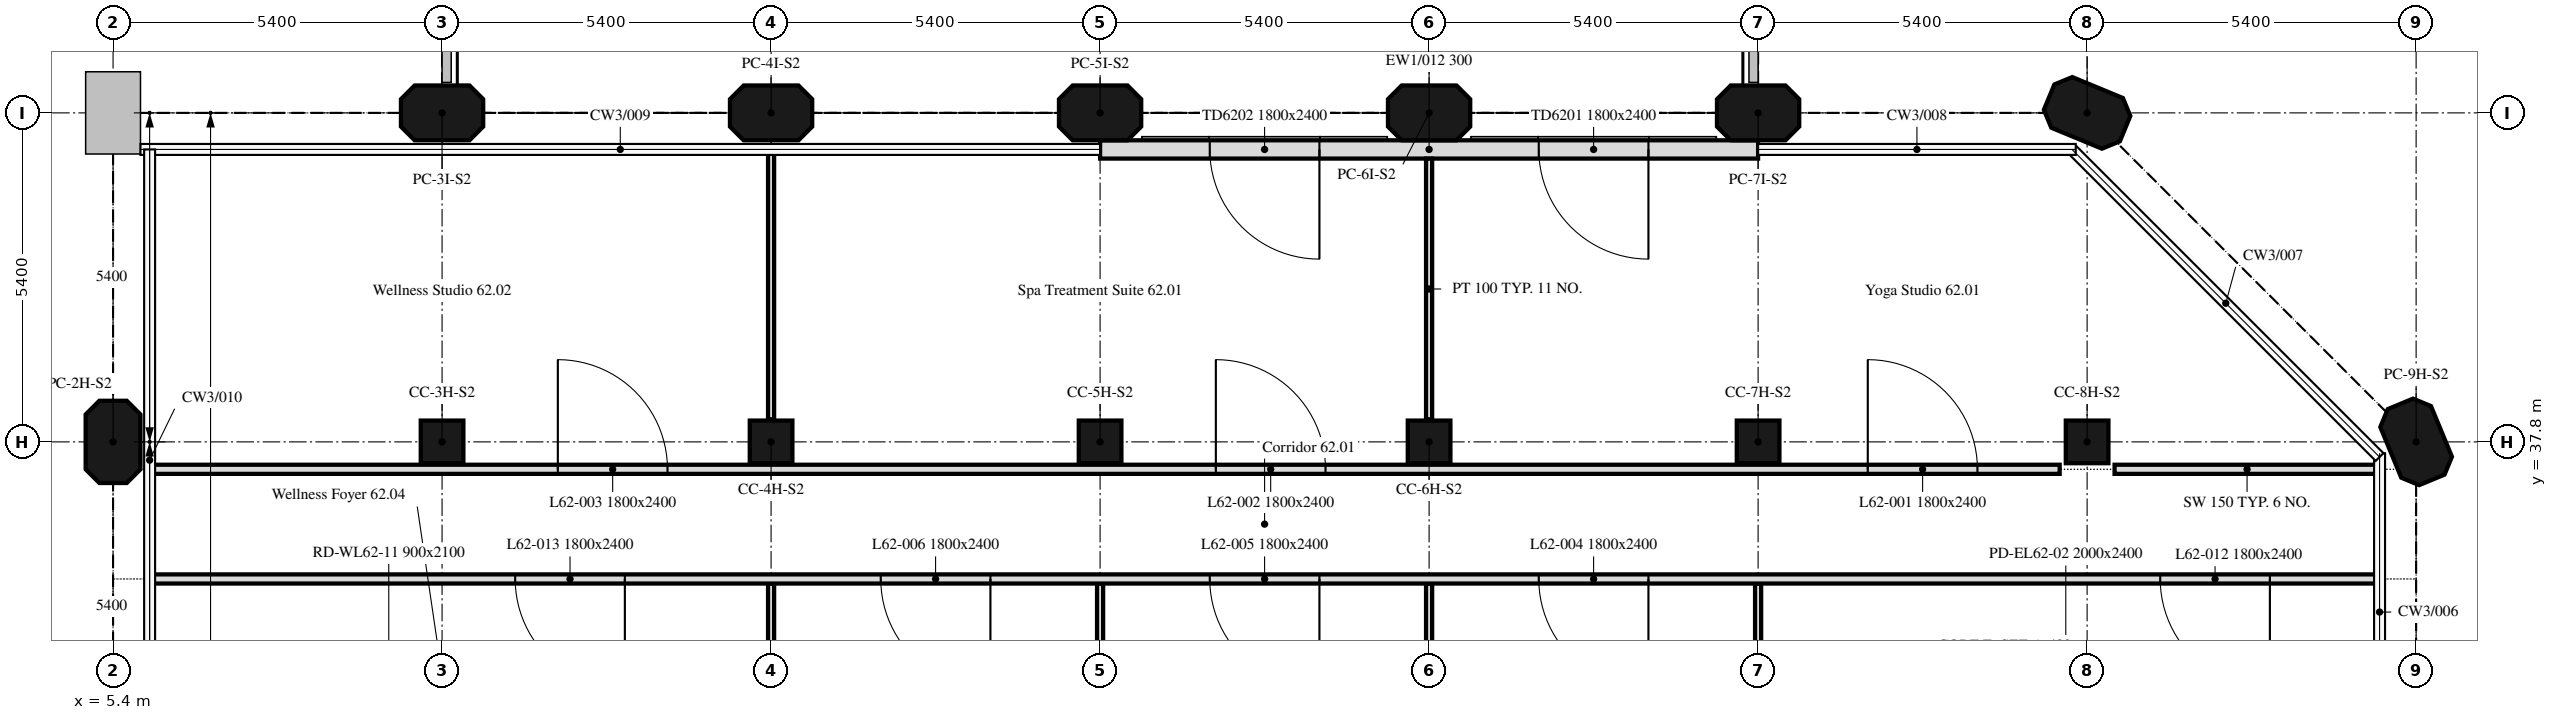
"""IFC4 building model, lengths in metres.
Left out: names, types, materials, properties, quantities, classifications, styles, units other than length and angle.
Written with IfcOpenShell. Run it as: python <this file> out.ifc"""

import sys

from ifc_helpers import new_model, si_unit, direction, frame, frame_2d, origin, origin_2d, place, context, subcontext, project, spatial, polyline, rectangle, outline, extrude, element, fill, save


model = new_model("IFC4")
c1 = context("Model", 3, precision=1e-05, world=origin(), true_north=direction((0.0, 1.0)))
c2 = subcontext(c1, "Body", "Model", "MODEL_VIEW")
j1 = project(units=[si_unit("LENGTHUNIT", "METRE"), si_unit("PLANEANGLEUNIT", "RADIAN")], contexts=[c1])
p1 = place(None, origin())
s1 = spatial("IfcSite", under=j1, at=p1, CompositionType="ELEMENT")
p2 = place(p1, origin())
s2 = spatial("IfcBuilding", under=s1, at=p2, CompositionType="ELEMENT")
p3 = place(p2, frame((0.0, 0.0, 255.7)))
s3 = spatial("IfcBuildingStorey", under=s2, at=p3, CompositionType="ELEMENT", Elevation=255.7)
p4 = place(p3, frame((5.4, 37.8, 0.0), z_axis=(0.0, 0.0, 1.0), x_axis=(0.0, 1.0, 0.0)))
e1 = element("IfcColumn", 1, at=p4, inside=s3, PredefinedType="COLUMN", context=c2, shape_type="SweptSolid", body=[
    extrude(outline(polyline([(-0.45, -0.45), (0.45, -0.45), (0.675, -0.225), (0.675, 0.225), (0.45, 0.45), (-0.45, 0.45), (-0.675, 0.225), (-0.675, -0.225), (-0.45, -0.45)])), origin(), (0.0, 0.0, 1.0), 4.5),
])
for number, where, z_axis, x_axis in (
    (2, (10.8, 37.8, 0.0), (0.0, 0.0, 1.0), (1.0, 0.0, 0.0)),
    (3, (16.2, 37.8, 0.0), (0.0, 0.0, 1.0), (1.0, 0.0, 0.0)),
    (4, (21.6, 37.8, 0.0), (0.0, 0.0, 1.0), (1.0, 0.0, 0.0)),
    (5, (27.0, 37.8, 0.0), (0.0, 0.0, 1.0), (1.0, 0.0, 0.0)),
    (6, (32.4, 37.8, 0.0), (0.0, 0.0, 1.0), (1.0, 0.0, 0.0)),
    (7, (37.8, 37.8, 0.0), (0.0, 0.0, 1.0), (1.0, 0.0, 0.0)),
):
    element("IfcColumn", number, at=place(p3, frame(where, z_axis=z_axis, x_axis=x_axis)), inside=s3, PredefinedType="COLUMN", context=c2, shape_type="SweptSolid", body=[
        extrude(rectangle(XDim=0.7, YDim=0.7, at=origin_2d()), origin(), (0.0, 0.0, 1.0), 4.5),
    ])
for number, where, z_axis, x_axis in (
    (8, (43.2, 37.8, 0.0), (0.0, 0.0, 1.0), (-0.383, 0.924, 0.0)),
    (9, (10.8, 43.2, 0.0), (0.0, 0.0, 1.0), (1.0, 0.0, 0.0)),
    (10, (16.2, 43.2, 0.0), (0.0, 0.0, 1.0), (1.0, 0.0, 0.0)),
    (11, (21.6, 43.2, 0.0), (0.0, 0.0, 1.0), (1.0, 0.0, 0.0)),
    (12, (27.0, 43.2, 0.0), (0.0, 0.0, 1.0), (1.0, 0.0, 0.0)),
    (13, (32.4, 43.2, 0.0), (0.0, 0.0, 1.0), (1.0, 0.0, 0.0)),
    (14, (37.8, 43.2, 0.0), (0.0, 0.0, 1.0), (-0.924, 0.383, 0.0)),
):
    element("IfcColumn", number, at=place(p3, frame(where, z_axis=z_axis, x_axis=x_axis)), inside=s3, PredefinedType="COLUMN", context=c2, shape_type="SweptSolid", body=[
        extrude(outline(polyline([(-0.45, -0.45), (0.45, -0.45), (0.675, -0.225), (0.675, 0.225), (0.45, 0.45), (-0.45, 0.45), (-0.675, 0.225), (-0.675, -0.225), (-0.45, -0.45)])), origin(), (0.0, 0.0, 1.0), 4.5),
    ])
p5 = place(p3, frame((32.4, 42.6, 0.0), z_axis=(0.0, 0.0, 1.0), x_axis=(-1.0, 0.0, 0.0)))
e15 = element("IfcWall", 15, at=p5, inside=s3, PredefinedType="SOLIDWALL", context=c2, shape_type="SweptSolid", body=[
    extrude(rectangle(XDim=10.8, YDim=0.3, at=frame_2d((5.4, 0.0))), origin(), (0.0, 0.0, 1.0), 4.5),
])
p6 = place(p5, frame((1.8, 0.0, 0.0)))
e16 = element("IfcOpeningElement", 16, at=p6, cuts=e15, PredefinedType="OPENING", context=c2, shape_type="SweptSolid", body=[
    extrude(rectangle(XDim=1.8, YDim=2.4, at=frame_2d((0.9, 1.2))), frame((0.0, 0.16, 0.0), z_axis=(0.0, -1.0, 0.0), x_axis=(1.0, 0.0, 0.0)), (0.0, 0.0, 1.0), 0.32),
])
p7 = place(p5, frame((7.2, 0.0, 0.0)))
e17 = element("IfcOpeningElement", 17, at=p7, cuts=e15, PredefinedType="OPENING", context=c2, shape_type="SweptSolid", body=[
    extrude(rectangle(XDim=1.8, YDim=2.4, at=frame_2d((0.9, 1.2))), frame((0.0, 0.16, 0.0), z_axis=(0.0, -1.0, 0.0), x_axis=(1.0, 0.0, 0.0)), (0.0, 0.0, 1.0), 0.32),
])
p8 = place(p3, frame((27.0, 42.449, 0.0), z_axis=(0.0, 0.0, 1.0), x_axis=(0.0, -1.0, 0.0)))
e18 = element("IfcWall", 18, at=p8, inside=s3, PredefinedType="PARTITIONING", context=c2, shape_type="SweptSolid", body=[
    extrude(rectangle(XDim=4.279, YDim=0.1, at=frame_2d((2.14, 0.0))), origin(), (0.0, 0.0, 1.0), 4.5),
])
p9 = place(p3, frame((38.251, 37.35, 0.0), z_axis=(0.0, 0.0, 1.0), x_axis=(1.0, 0.0, 0.0)))
e19 = element("IfcWall", 19, at=p9, inside=s3, PredefinedType="PARTITIONING", context=c2, shape_type="SweptSolid", body=[
    extrude(rectangle(XDim=4.349, YDim=0.15, at=frame_2d((2.175, 0.0))), origin(), (0.0, 0.0, 1.0), 4.5),
])
p10 = place(p3, frame((16.2, 42.6, 0.0), z_axis=(0.0, 0.0, 1.0), x_axis=(0.0, -1.0, 0.0)))
e20 = element("IfcWall", 20, at=p10, inside=s3, PredefinedType="PARTITIONING", context=c2, shape_type="SweptSolid", body=[
    extrude(rectangle(XDim=4.43, YDim=0.1, at=frame_2d((2.215, 0.0))), origin(), (0.0, 0.0, 1.0), 4.5),
])
p11 = place(p3, frame((6.0, 37.35, 0.0), z_axis=(0.0, 0.0, 1.0), x_axis=(1.0, 0.0, 0.0)))
e21 = element("IfcWall", 21, at=p11, inside=s3, PredefinedType="PARTITIONING", context=c2, shape_type="SweptSolid", body=[
    extrude(rectangle(XDim=31.349, YDim=0.15, at=frame_2d((15.675, 0.0))), origin(), (0.0, 0.0, 1.0), 4.5),
])
p12 = place(p11, frame((28.2, 0.0, 0.0)))
e22 = element("IfcOpeningElement", 22, at=p12, cuts=e21, PredefinedType="OPENING", context=c2, shape_type="SweptSolid", body=[
    extrude(rectangle(XDim=1.8, YDim=2.4, at=frame_2d((0.9, 1.2))), frame((0.0, 0.075, 0.0), z_axis=(0.0, -1.0, 0.0), x_axis=(1.0, 0.0, 0.0)), (0.0, 0.0, 1.0), 0.15),
])
p13 = place(p11, frame((17.5, 0.0, 0.0)))
e23 = element("IfcOpeningElement", 23, at=p13, cuts=e21, PredefinedType="OPENING", context=c2, shape_type="SweptSolid", body=[
    extrude(rectangle(XDim=1.8, YDim=2.4, at=frame_2d((0.9, 1.2))), frame((0.0, 0.075, 0.0), z_axis=(0.0, -1.0, 0.0), x_axis=(1.0, 0.0, 0.0)), (0.0, 0.0, 1.0), 0.15),
])
p14 = place(p11, frame((6.7, 0.0, 0.0)))
e24 = element("IfcOpeningElement", 24, at=p14, cuts=e21, PredefinedType="OPENING", context=c2, shape_type="SweptSolid", body=[
    extrude(rectangle(XDim=1.8, YDim=2.4, at=frame_2d((0.9, 1.2))), frame((0.0, 0.075, 0.0), z_axis=(0.0, -1.0, 0.0), x_axis=(1.0, 0.0, 0.0)), (0.0, 0.0, 1.0), 0.15),
])
p15 = place(p3, frame((32.4, 32.4, 0.0), z_axis=(0.0, 0.0, 1.0), x_axis=(0.0, 1.0, 0.0)))
e25 = element("IfcWall", 25, at=p15, inside=s3, PredefinedType="PARTITIONING", context=c2, shape_type="SweptSolid", body=[
    extrude(rectangle(XDim=3.075, YDim=0.1, at=frame_2d((1.538, 0.0))), origin(), (0.0, 0.0, 1.0), 4.5),
])
for number, where, z_axis, x_axis in (
    (26, (27.0, 35.475, 0.0), (0.0, 0.0, 1.0), (0.0, -1.0, 0.0)),
    (27, (21.6, 35.475, 0.0), (0.0, 0.0, 1.0), (0.0, -1.0, 0.0)),
):
    element("IfcWall", number, at=place(p3, frame(where, z_axis=z_axis, x_axis=x_axis)), inside=s3, PredefinedType="PARTITIONING", context=c2, shape_type="SweptSolid", body=[
        extrude(rectangle(XDim=2.655, YDim=0.1, at=frame_2d((1.328, 0.0))), origin(), (0.0, 0.0, 1.0), 4.5),
    ])
p16 = place(p3, frame((16.2, 35.475, 0.0), z_axis=(0.0, 0.0, 1.0), x_axis=(0.0, -1.0, 0.0)))
e28 = element("IfcWall", 28, at=p16, inside=s3, PredefinedType="PARTITIONING", context=c2, shape_type="SweptSolid", body=[
    extrude(rectangle(XDim=3.075, YDim=0.1, at=frame_2d((1.538, 0.0))), origin(), (0.0, 0.0, 1.0), 4.5),
])
p17 = place(p3, frame((42.6, 35.55, 0.0), z_axis=(0.0, 0.0, 1.0), x_axis=(-1.0, 0.0, 0.0)))
e29 = element("IfcWall", 29, at=p17, inside=s3, PredefinedType="PARTITIONING", context=c2, shape_type="SweptSolid", body=[
    extrude(rectangle(XDim=36.6, YDim=0.15, at=frame_2d((18.3, 0.0))), origin(), (0.0, 0.0, 1.0), 4.5),
])
p18 = place(p17, frame((12.0, 0.0, 0.0)))
e30 = element("IfcOpeningElement", 30, at=p18, cuts=e29, PredefinedType="OPENING", context=c2, shape_type="SweptSolid", body=[
    extrude(rectangle(XDim=1.8, YDim=2.4, at=frame_2d((0.9, 1.2))), frame((0.0, 0.075, 0.0), z_axis=(0.0, -1.0, 0.0), x_axis=(1.0, 0.0, 0.0)), (0.0, 0.0, 1.0), 0.15),
])
p19 = place(p17, frame((17.4, 0.0, 0.0)))
e31 = element("IfcOpeningElement", 31, at=p19, cuts=e29, PredefinedType="OPENING", context=c2, shape_type="SweptSolid", body=[
    extrude(rectangle(XDim=1.8, YDim=2.4, at=frame_2d((0.9, 1.2))), frame((0.0, 0.075, 0.0), z_axis=(0.0, -1.0, 0.0), x_axis=(1.0, 0.0, 0.0)), (0.0, 0.0, 1.0), 0.15),
])
p20 = place(p17, frame((22.8, 0.0, 0.0)))
e32 = element("IfcOpeningElement", 32, at=p20, cuts=e29, PredefinedType="OPENING", context=c2, shape_type="SweptSolid", body=[
    extrude(rectangle(XDim=1.8, YDim=2.4, at=frame_2d((0.9, 1.2))), frame((0.0, 0.075, 0.0), z_axis=(0.0, -1.0, 0.0), x_axis=(1.0, 0.0, 0.0)), (0.0, 0.0, 1.0), 0.15),
])
p21 = place(p17, frame((1.8, 0.0, 0.0)))
e33 = element("IfcOpeningElement", 33, at=p21, cuts=e29, PredefinedType="OPENING", context=c2, shape_type="SweptSolid", body=[
    extrude(rectangle(XDim=1.8, YDim=2.4, at=frame_2d((0.9, 1.2))), frame((0.0, 0.075, 0.0), z_axis=(0.0, -1.0, 0.0), x_axis=(1.0, 0.0, 0.0)), (0.0, 0.0, 1.0), 0.15),
])
p22 = place(p17, frame((28.8, 0.0, 0.0)))
e34 = element("IfcOpeningElement", 34, at=p22, cuts=e29, PredefinedType="OPENING", context=c2, shape_type="SweptSolid", body=[
    extrude(rectangle(XDim=1.8, YDim=2.4, at=frame_2d((0.9, 1.2))), frame((0.0, 0.075, 0.0), z_axis=(0.0, -1.0, 0.0), x_axis=(1.0, 0.0, 0.0)), (0.0, 0.0, 1.0), 0.15),
])
p23 = place(p6, origin())
e35 = element("IfcDoor", 35, at=p23, inside=s3, OperationType="DOUBLE_DOOR_DOUBLE_SWING", PredefinedType="DOOR", context=c2, shape_type="SweptSolid", body=[
    extrude(rectangle(XDim=1.8, YDim=2.4, at=frame_2d((0.9, 1.2))), frame((0.0, 0.025, 0.0), z_axis=(0.0, -1.0, 0.0), x_axis=(1.0, 0.0, 0.0)), (0.0, 0.0, 1.0), 0.05),
])
fill(e16, e35)
p24 = place(p7, origin())
e36 = element("IfcDoor", 36, at=p24, inside=s3, OperationType="DOUBLE_DOOR_DOUBLE_SWING", PredefinedType="DOOR", context=c2, shape_type="SweptSolid", body=[
    extrude(rectangle(XDim=1.8, YDim=2.4, at=frame_2d((0.9, 1.2))), frame((0.0, 0.025, 0.0), z_axis=(0.0, -1.0, 0.0), x_axis=(1.0, 0.0, 0.0)), (0.0, 0.0, 1.0), 0.05),
])
fill(e17, e36)
p25 = place(p12, origin())
e37 = element("IfcDoor", 37, at=p25, inside=s3, OperationType="DOUBLE_DOOR_SINGLE_SWING", PredefinedType="DOOR", context=c2, shape_type="SweptSolid", body=[
    extrude(rectangle(XDim=1.8, YDim=2.4, at=frame_2d((0.9, 1.2))), frame((0.0, 0.025, 0.0), z_axis=(0.0, -1.0, 0.0), x_axis=(1.0, 0.0, 0.0)), (0.0, 0.0, 1.0), 0.05),
])
fill(e22, e37)
p26 = place(p13, origin())
e38 = element("IfcDoor", 38, at=p26, inside=s3, OperationType="DOUBLE_DOOR_SINGLE_SWING", PredefinedType="DOOR", context=c2, shape_type="SweptSolid", body=[
    extrude(rectangle(XDim=1.8, YDim=2.4, at=frame_2d((0.9, 1.2))), frame((0.0, 0.025, 0.0), z_axis=(0.0, -1.0, 0.0), x_axis=(1.0, 0.0, 0.0)), (0.0, 0.0, 1.0), 0.05),
])
fill(e23, e38)
p27 = place(p14, origin())
e39 = element("IfcDoor", 39, at=p27, inside=s3, OperationType="DOUBLE_DOOR_SINGLE_SWING", PredefinedType="DOOR", context=c2, shape_type="SweptSolid", body=[
    extrude(rectangle(XDim=1.8, YDim=2.4, at=frame_2d((0.9, 1.2))), frame((0.0, 0.025, 0.0), z_axis=(0.0, -1.0, 0.0), x_axis=(1.0, 0.0, 0.0)), (0.0, 0.0, 1.0), 0.05),
])
fill(e24, e39)
p28 = place(p18, origin())
e40 = element("IfcDoor", 40, at=p28, inside=s3, OperationType="DOUBLE_DOOR_SINGLE_SWING", PredefinedType="DOOR", context=c2, shape_type="SweptSolid", body=[
    extrude(rectangle(XDim=1.8, YDim=2.4, at=frame_2d((0.9, 1.2))), frame((0.0, 0.025, 0.0), z_axis=(0.0, -1.0, 0.0), x_axis=(1.0, 0.0, 0.0)), (0.0, 0.0, 1.0), 0.05),
])
fill(e30, e40)
p29 = place(p19, origin())
e41 = element("IfcDoor", 41, at=p29, inside=s3, OperationType="DOUBLE_DOOR_SINGLE_SWING", PredefinedType="DOOR", context=c2, shape_type="SweptSolid", body=[
    extrude(rectangle(XDim=1.8, YDim=2.4, at=frame_2d((0.9, 1.2))), frame((0.0, 0.025, 0.0), z_axis=(0.0, -1.0, 0.0), x_axis=(1.0, 0.0, 0.0)), (0.0, 0.0, 1.0), 0.05),
])
fill(e31, e41)
p30 = place(p20, origin())
e42 = element("IfcDoor", 42, at=p30, inside=s3, OperationType="DOUBLE_DOOR_SINGLE_SWING", PredefinedType="DOOR", context=c2, shape_type="SweptSolid", body=[
    extrude(rectangle(XDim=1.8, YDim=2.4, at=frame_2d((0.9, 1.2))), frame((0.0, 0.025, 0.0), z_axis=(0.0, -1.0, 0.0), x_axis=(1.0, 0.0, 0.0)), (0.0, 0.0, 1.0), 0.05),
])
fill(e32, e42)
p31 = place(p21, origin())
e43 = element("IfcDoor", 43, at=p31, inside=s3, OperationType="DOUBLE_DOOR_SINGLE_SWING", PredefinedType="DOOR", context=c2, shape_type="SweptSolid", body=[
    extrude(rectangle(XDim=1.8, YDim=2.4, at=frame_2d((0.9, 1.2))), frame((0.0, 0.025, 0.0), z_axis=(0.0, -1.0, 0.0), x_axis=(1.0, 0.0, 0.0)), (0.0, 0.0, 1.0), 0.05),
])
fill(e33, e43)
p32 = place(p22, origin())
e44 = element("IfcDoor", 44, at=p32, inside=s3, OperationType="DOUBLE_DOOR_SINGLE_SWING", PredefinedType="DOOR", context=c2, shape_type="SweptSolid", body=[
    extrude(rectangle(XDim=1.8, YDim=2.4, at=frame_2d((0.9, 1.2))), frame((0.0, 0.025, 0.0), z_axis=(0.0, -1.0, 0.0), x_axis=(1.0, 0.0, 0.0)), (0.0, 0.0, 1.0), 0.05),
])
fill(e34, e44)
save(model, sys.argv[1])
